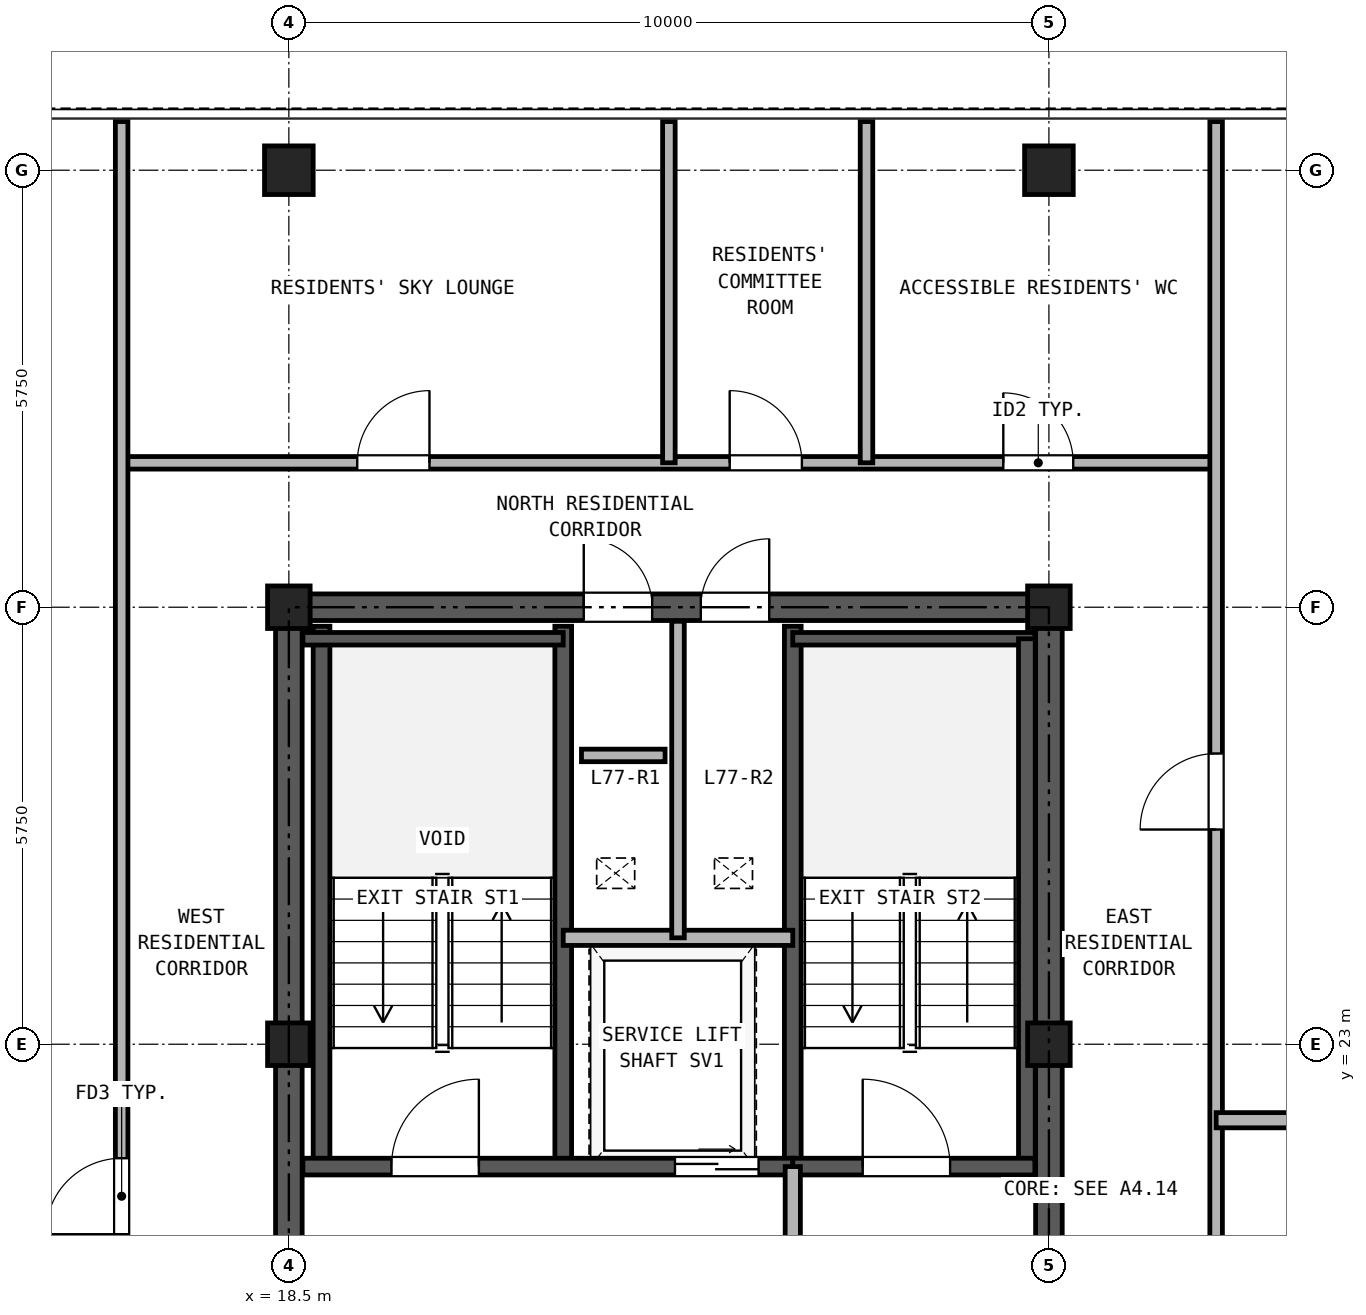
"""IFC4 building model, lengths in metres.
Left out: names, types, materials, properties, quantities, classifications, styles, units other than length and angle.
Written with IfcOpenShell. Run it as: python <this file> out.ifc"""

import sys

from ifc_helpers import new_model, si_unit, direction, frame, frame_2d, origin, origin_2d, place, context, subcontext, project, spatial, rectangle, hollow_rectangle, extrude, source, transform, mapped, element, fill, save


model = new_model("IFC4")
c1 = context("Model", 3, precision=1e-05, world=origin(), true_north=direction((0.0, 1.0)))
c2 = subcontext(c1, "Body", "Model", "MODEL_VIEW")
j1 = project(units=[si_unit("LENGTHUNIT", "METRE"), si_unit("PLANEANGLEUNIT", "RADIAN")], contexts=[c1])
p1 = place(None, origin())
s1 = spatial("IfcSite", under=j1, at=p1, CompositionType="ELEMENT")
p2 = place(p1, origin())
s2 = spatial("IfcBuilding", under=s1, at=p2, CompositionType="ELEMENT")
p3 = place(p2, frame((0.0, 0.0, 268.1)))
s3 = spatial("IfcBuildingStorey", under=s2, at=p3, CompositionType="ELEMENT", Elevation=268.1)
m1 = source(origin(), c2, "Body", "SweptSolid", [
    extrude(hollow_rectangle(XDim=0.64, YDim=0.64, WallThickness=0.035, at=origin_2d()), origin(), (0.0, 0.0, 1.0), 2.98),
])
for number, where, z_axis, x_axis in (
    (1, (18.5, 34.5, 0.0), (0.0, 0.0, 1.0), (1.0, 0.0, 0.0)),
    (2, (28.5, 34.5, 0.0), (0.0, 0.0, 1.0), (1.0, 0.0, 0.0)),
):
    element("IfcColumn", number, at=place(p3, frame(where, z_axis=z_axis, x_axis=x_axis)), inside=s3, PredefinedType="COLUMN", context=c2, shape_type="MappedRepresentation", body=[
        mapped(m1, transform((0.0, 0.0, 0.0), x_axis=(1.0, 0.0, 0.0), y_axis=(0.0, 1.0, 0.0), z_axis=(0.0, 0.0, 1.0), scale=1.0)),
    ])
m2 = source(origin(), c2, "Body", "SweptSolid", [
    extrude(hollow_rectangle(XDim=0.56, YDim=0.56, WallThickness=0.03, at=origin_2d()), origin(), (0.0, 0.0, 1.0), 2.98),
])
for number, where, z_axis, x_axis in (
    (3, (18.5, 23.0, 0.0), (0.0, 0.0, 1.0), (1.0, 0.0, 0.0)),
    (4, (18.5, 28.75, 0.0), (0.0, 0.0, 1.0), (1.0, 0.0, 0.0)),
    (5, (28.5, 23.0, 0.0), (0.0, 0.0, 1.0), (1.0, 0.0, 0.0)),
    (6, (28.5, 28.75, 0.0), (0.0, 0.0, 1.0), (1.0, 0.0, 0.0)),
):
    element("IfcColumn", number, at=place(p3, frame(where, z_axis=z_axis, x_axis=x_axis)), inside=s3, PredefinedType="COLUMN", context=c2, shape_type="MappedRepresentation", body=[
        mapped(m2, transform((0.0, 0.0, 0.0), x_axis=(1.0, 0.0, 0.0), y_axis=(0.0, 1.0, 0.0), z_axis=(0.0, 0.0, 1.0), scale=1.0)),
    ])
p4 = place(p3, frame((18.325, 28.75, 0.0), z_axis=(0.0, 0.0, 1.0), x_axis=(1.0, 0.0, 0.0)))
e7 = element("IfcWall", 7, at=p4, inside=s3, PredefinedType="SHEAR", context=c2, shape_type="SweptSolid", body=[
    extrude(rectangle(XDim=10.35, YDim=0.35, at=frame_2d((5.175, 0.0))), origin(), (0.0, 0.0, 1.0), 2.98),
])
p5 = place(p4, frame((4.055, 0.0, 0.0)))
e8 = element("IfcOpeningElement", 8, at=p5, cuts=e7, PredefinedType="OPENING", context=c2, shape_type="SweptSolid", body=[
    extrude(rectangle(XDim=0.9, YDim=2.05, at=frame_2d((0.45, 1.025))), frame((0.0, 0.185, 0.0), z_axis=(0.0, -1.0, 0.0), x_axis=(1.0, 0.0, 0.0)), (0.0, 0.0, 1.0), 0.37),
])
p6 = place(p4, frame((5.595, 0.0, 0.0)))
e9 = element("IfcOpeningElement", 9, at=p6, cuts=e7, PredefinedType="OPENING", context=c2, shape_type="SweptSolid", body=[
    extrude(rectangle(XDim=0.9, YDim=2.05, at=frame_2d((0.45, 1.025))), frame((0.0, 0.185, 0.0), z_axis=(0.0, -1.0, 0.0), x_axis=(1.0, 0.0, 0.0)), (0.0, 0.0, 1.0), 0.37),
])
p7 = place(p3, frame((18.5, 11.675, 0.0), z_axis=(0.0, 0.0, 1.0), x_axis=(0.0, 1.0, 0.0)))
e10 = element("IfcWall", 10, at=p7, inside=s3, PredefinedType="SHEAR", context=c2, shape_type="SweptSolid", body=[
    extrude(rectangle(XDim=16.9, YDim=0.35, at=frame_2d((8.45, 0.0))), origin(), (0.0, 0.0, 1.0), 2.98),
])
p8 = place(p7, frame((7.475, 0.0, 0.0)))
e11 = element("IfcOpeningElement", 11, at=p8, cuts=e10, PredefinedType="OPENING", context=c2, shape_type="SweptSolid", body=[
    extrude(rectangle(XDim=1.15, YDim=2.2, at=frame_2d((0.575, 1.1))), frame((0.0, 0.185, 0.0), z_axis=(0.0, -1.0, 0.0), x_axis=(1.0, 0.0, 0.0)), (0.0, 0.0, 1.0), 0.37),
])
p9 = place(p3, frame((28.5, 11.675, 0.0), z_axis=(0.0, 0.0, 1.0), x_axis=(0.0, 1.0, 0.0)))
e12 = element("IfcWall", 12, at=p9, inside=s3, PredefinedType="SHEAR", context=c2, shape_type="SweptSolid", body=[
    extrude(rectangle(XDim=16.9, YDim=0.35, at=frame_2d((8.45, 0.0))), origin(), (0.0, 0.0, 1.0), 2.98),
])
p10 = place(p9, frame((7.475, 0.0, 0.0)))
e13 = element("IfcOpeningElement", 13, at=p10, cuts=e12, PredefinedType="OPENING", context=c2, shape_type="SweptSolid", body=[
    extrude(rectangle(XDim=1.15, YDim=2.2, at=frame_2d((0.575, 1.1))), frame((0.0, 0.185, 0.0), z_axis=(0.0, -1.0, 0.0), x_axis=(1.0, 0.0, 0.0)), (0.0, 0.0, 1.0), 0.37),
])
for number, where, z_axis, x_axis in (
    (14, (18.93, 21.39, 0.0), (0.0, 0.0, 1.0), (0.0, 1.0, 0.0)),
    (15, (22.11, 21.39, 0.0), (0.0, 0.0, 1.0), (0.0, 1.0, 0.0)),
    (16, (25.13, 21.39, 0.0), (0.0, 0.0, 1.0), (0.0, 1.0, 0.0)),
):
    element("IfcWall", number, at=place(p3, frame(where, z_axis=z_axis, x_axis=x_axis)), inside=s3, PredefinedType="SOLIDWALL", context=c2, shape_type="SweptSolid", body=[
        extrude(rectangle(XDim=7.11, YDim=0.22, at=frame_2d((3.555, 0.0))), origin(), (0.0, 0.0, 1.0), 2.98),
    ])
p11 = place(p3, frame((18.685, 28.335, 0.0), z_axis=(0.0, 0.0, 1.0), x_axis=(1.0, 0.0, 0.0)))
e17 = element("IfcWall", 17, at=p11, inside=s3, PredefinedType="PARTITIONING", context=c2, shape_type="SweptSolid", body=[
    extrude(rectangle(XDim=3.425, YDim=0.165, at=frame_2d((1.712, 0.0))), origin(), (0.0, 0.0, 1.0), 2.98),
])
p12 = place(p3, frame((25.13, 28.335, 0.0), z_axis=(0.0, 0.0, 1.0), x_axis=(1.0, 0.0, 0.0)))
e18 = element("IfcWall", 18, at=p12, inside=s3, PredefinedType="PARTITIONING", context=c2, shape_type="SweptSolid", body=[
    extrude(rectangle(XDim=3.185, YDim=0.165, at=frame_2d((1.593, 0.0))), origin(), (0.0, 0.0, 1.0), 2.98),
])
p13 = place(p3, frame((28.21, 21.39, 0.0), z_axis=(0.0, 0.0, 1.0), x_axis=(0.0, 1.0, 0.0)))
e19 = element("IfcWall", 19, at=p13, inside=s3, PredefinedType="SOLIDWALL", context=c2, shape_type="SweptSolid", body=[
    extrude(rectangle(XDim=6.945, YDim=0.22, at=frame_2d((3.473, 0.0))), origin(), (0.0, 0.0, 1.0), 2.98),
])
p14 = place(p3, frame((18.685, 21.39, 0.0), z_axis=(0.0, 0.0, 1.0), x_axis=(1.0, 0.0, 0.0)))
e20 = element("IfcWall", 20, at=p14, inside=s3, PredefinedType="SOLIDWALL", context=c2, shape_type="SweptSolid", body=[
    extrude(rectangle(XDim=6.445, YDim=0.22, at=frame_2d((3.222, 0.0))), origin(), (0.0, 0.0, 1.0), 2.98),
])
p15 = place(p14, frame((1.165, 0.0, 0.0)))
e21 = element("IfcOpeningElement", 21, at=p15, cuts=e20, PredefinedType="OPENING", context=c2, shape_type="SweptSolid", body=[
    extrude(rectangle(XDim=1.15, YDim=2.2, at=frame_2d((0.575, 1.1))), frame((0.0, 0.12, 0.0), z_axis=(0.0, -1.0, 0.0), x_axis=(1.0, 0.0, 0.0)), (0.0, 0.0, 1.0), 0.24),
])
p16 = place(p14, frame((4.895, 0.0, 0.0)))
e22 = element("IfcOpeningElement", 22, at=p16, cuts=e20, PredefinedType="OPENING", context=c2, shape_type="SweptSolid", body=[
    extrude(rectangle(XDim=1.1, YDim=2.25, at=frame_2d((0.55, 1.125))), frame((0.0, 0.12, 0.0), z_axis=(0.0, -1.0, 0.0), x_axis=(1.0, 0.0, 0.0)), (0.0, 0.0, 1.0), 0.24),
])
p17 = place(p3, frame((25.13, 21.39, 0.0), z_axis=(0.0, 0.0, 1.0), x_axis=(1.0, 0.0, 0.0)))
e23 = element("IfcWall", 23, at=p17, inside=s3, PredefinedType="SOLIDWALL", context=c2, shape_type="SweptSolid", body=[
    extrude(rectangle(XDim=3.185, YDim=0.22, at=frame_2d((1.593, 0.0))), origin(), (0.0, 0.0, 1.0), 2.98),
])
p18 = place(p17, frame((0.92, 0.0, 0.0)))
e24 = element("IfcOpeningElement", 24, at=p18, cuts=e23, PredefinedType="OPENING", context=c2, shape_type="SweptSolid", body=[
    extrude(rectangle(XDim=1.15, YDim=2.2, at=frame_2d((0.575, 1.1))), frame((0.0, 0.12, 0.0), z_axis=(0.0, -1.0, 0.0), x_axis=(1.0, 0.0, 0.0)), (0.0, 0.0, 1.0), 0.24),
])
p19 = place(p3, frame((22.11, 24.4, 0.0), z_axis=(0.0, 0.0, 1.0), x_axis=(1.0, 0.0, 0.0)))
e25 = element("IfcWall", 25, at=p19, inside=s3, PredefinedType="PARTITIONING", context=c2, shape_type="SweptSolid", body=[
    extrude(rectangle(XDim=3.02, YDim=0.2, at=frame_2d((1.51, 0.0))), origin(), (0.0, 0.0, 1.0), 2.98),
])
p20 = place(p3, frame((23.62, 24.4, 0.0), z_axis=(0.0, 0.0, 1.0), x_axis=(0.0, 1.0, 0.0)))
e26 = element("IfcWall", 26, at=p20, inside=s3, PredefinedType="PARTITIONING", context=c2, shape_type="SweptSolid", body=[
    extrude(rectangle(XDim=4.165, YDim=0.165, at=frame_2d((2.083, 0.0))), origin(), (0.0, 0.0, 1.0), 2.98),
])
p21 = place(p3, frame((25.13, 18.0, 0.0), z_axis=(0.0, 0.0, 1.0), x_axis=(0.0, 1.0, 0.0)))
e27 = element("IfcWall", 27, at=p21, inside=s3, PredefinedType="PARTITIONING", context=c2, shape_type="SweptSolid", body=[
    extrude(rectangle(XDim=3.39, YDim=0.2, at=frame_2d((1.695, 0.0))), origin(), (0.0, 0.0, 1.0), 2.98),
])
p22 = place(p21, frame((1.1, 0.0, 0.0)))
e28 = element("IfcOpeningElement", 28, at=p22, cuts=e27, PredefinedType="OPENING", context=c2, shape_type="SweptSolid", body=[
    extrude(rectangle(XDim=1.15, YDim=2.2, at=frame_2d((0.575, 1.1))), frame((0.0, 0.11, 0.0), z_axis=(0.0, -1.0, 0.0), x_axis=(1.0, 0.0, 0.0)), (0.0, 0.0, 1.0), 0.22),
])
p23 = place(p3, frame((16.3, 30.65, 0.0), z_axis=(0.0, 0.0, 1.0), x_axis=(1.0, 0.0, 0.0)))
e29 = element("IfcWall", 29, at=p23, inside=s3, PredefinedType="PARTITIONING", context=c2, shape_type="SweptSolid", body=[
    extrude(rectangle(XDim=14.4, YDim=0.165, at=frame_2d((7.2, 0.0))), origin(), (0.0, 0.0, 1.0), 2.98),
])
p24 = place(p23, frame((3.1, 0.0, 0.0)))
e30 = element("IfcOpeningElement", 30, at=p24, cuts=e29, PredefinedType="OPENING", context=c2, shape_type="SweptSolid", body=[
    extrude(rectangle(XDim=0.95, YDim=2.15, at=frame_2d((0.475, 1.075))), frame((0.0, 0.093, 0.0), z_axis=(0.0, -1.0, 0.0), x_axis=(1.0, 0.0, 0.0)), (0.0, 0.0, 1.0), 0.185),
])
p25 = place(p23, frame((8.0, 0.0, 0.0)))
e31 = element("IfcOpeningElement", 31, at=p25, cuts=e29, PredefinedType="OPENING", context=c2, shape_type="SweptSolid", body=[
    extrude(rectangle(XDim=0.95, YDim=2.15, at=frame_2d((0.475, 1.075))), frame((0.0, 0.093, 0.0), z_axis=(0.0, -1.0, 0.0), x_axis=(1.0, 0.0, 0.0)), (0.0, 0.0, 1.0), 0.185),
])
p26 = place(p23, frame((11.6, 0.0, 0.0)))
e32 = element("IfcOpeningElement", 32, at=p26, cuts=e29, PredefinedType="OPENING", context=c2, shape_type="SweptSolid", body=[
    extrude(rectangle(XDim=0.92, YDim=2.1, at=frame_2d((0.46, 1.05))), frame((0.0, 0.093, 0.0), z_axis=(0.0, -1.0, 0.0), x_axis=(1.0, 0.0, 0.0)), (0.0, 0.0, 1.0), 0.185),
])
p27 = place(p3, frame((16.3, 11.35, 0.0), z_axis=(0.0, 0.0, 1.0), x_axis=(0.0, 1.0, 0.0)))
e33 = element("IfcWall", 33, at=p27, inside=s3, PredefinedType="PARTITIONING", context=c2, shape_type="SweptSolid", body=[
    extrude(rectangle(XDim=23.79, YDim=0.165, at=frame_2d((11.895, 0.0))), origin(), (0.0, 0.0, 1.0), 2.98),
])
p28 = place(p27, frame((9.15, 0.0, 0.0)))
e34 = element("IfcOpeningElement", 34, at=p28, cuts=e33, PredefinedType="OPENING", context=c2, shape_type="SweptSolid", body=[
    extrude(rectangle(XDim=1.0, YDim=2.15, at=frame_2d((0.5, 1.075))), frame((0.0, 0.093, 0.0), z_axis=(0.0, -1.0, 0.0), x_axis=(1.0, 0.0, 0.0)), (0.0, 0.0, 1.0), 0.185),
])
p29 = place(p3, frame((30.7, 11.35, 0.0), z_axis=(0.0, 0.0, 1.0), x_axis=(0.0, 1.0, 0.0)))
e35 = element("IfcWall", 35, at=p29, inside=s3, PredefinedType="PARTITIONING", context=c2, shape_type="SweptSolid", body=[
    extrude(rectangle(XDim=23.79, YDim=0.165, at=frame_2d((11.895, 0.0))), origin(), (0.0, 0.0, 1.0), 2.98),
])
p30 = place(p29, frame((4.825, 0.0, 0.0)))
e36 = element("IfcOpeningElement", 36, at=p30, cuts=e35, PredefinedType="OPENING", context=c2, shape_type="SweptSolid", body=[
    extrude(rectangle(XDim=1.0, YDim=2.15, at=frame_2d((0.5, 1.075))), frame((0.0, 0.093, 0.0), z_axis=(0.0, -1.0, 0.0), x_axis=(1.0, 0.0, 0.0)), (0.0, 0.0, 1.0), 0.185),
])
p31 = place(p29, frame((14.475, 0.0, 0.0)))
e37 = element("IfcOpeningElement", 37, at=p31, cuts=e35, PredefinedType="OPENING", context=c2, shape_type="SweptSolid", body=[
    extrude(rectangle(XDim=1.0, YDim=2.15, at=frame_2d((0.5, 1.075))), frame((0.0, 0.093, 0.0), z_axis=(0.0, -1.0, 0.0), x_axis=(1.0, 0.0, 0.0)), (0.0, 0.0, 1.0), 0.185),
])
p32 = place(p3, frame((30.7, 22.0, 0.0), z_axis=(0.0, 0.0, 1.0), x_axis=(1.0, 0.0, 0.0)))
e38 = element("IfcWall", 38, at=p32, inside=s3, PredefinedType="PARTITIONING", context=c2, shape_type="SweptSolid", body=[
    extrude(rectangle(XDim=10.94, YDim=0.2, at=frame_2d((5.47, 0.0))), origin(), (0.0, 0.0, 1.0), 2.98),
])
for number, where, z_axis, x_axis in (
    (39, (23.5, 30.65, 0.0), (0.0, 0.0, 1.0), (0.0, 1.0, 0.0)),
    (40, (26.1, 30.65, 0.0), (0.0, 0.0, 1.0), (0.0, 1.0, 0.0)),
):
    element("IfcWall", number, at=place(p3, frame(where, z_axis=z_axis, x_axis=x_axis)), inside=s3, PredefinedType="PARTITIONING", context=c2, shape_type="SweptSolid", body=[
        extrude(rectangle(XDim=4.49, YDim=0.165, at=frame_2d((2.245, 0.0))), origin(), (0.0, 0.0, 1.0), 2.98),
    ])
p33 = place(p3, frame((22.35, 26.8, 0.0), z_axis=(0.0, 0.0, 1.0), x_axis=(1.0, 0.0, 0.0)))
e41 = element("IfcWall", 41, at=p33, inside=s3, PredefinedType="PARTITIONING", context=c2, shape_type="SweptSolid", body=[
    extrude(rectangle(XDim=1.1, YDim=0.165, at=frame_2d((0.55, 0.0))), origin(), (0.0, 0.0, 1.0), 2.98),
])
p34 = place(p15, frame((1.15, 0.0, 0.0), z_axis=(0.0, 0.0, 1.0), x_axis=(-1.0, 0.0, 0.0)))
e42 = element("IfcDoor", 42, at=p34, inside=s3, OperationType="SINGLE_SWING_RIGHT", PredefinedType="DOOR", context=c2, shape_type="SweptSolid", body=[
    extrude(rectangle(XDim=1.15, YDim=2.2, at=frame_2d((0.575, 1.1))), frame((0.0, 0.025, 0.0), z_axis=(0.0, -1.0, 0.0), x_axis=(1.0, 0.0, 0.0)), (0.0, 0.0, 1.0), 0.05),
])
fill(e21, e42)
p35 = place(p18, frame((1.15, 0.0, 0.0), z_axis=(0.0, 0.0, 1.0), x_axis=(-1.0, 0.0, 0.0)))
e43 = element("IfcDoor", 43, at=p35, inside=s3, OperationType="SINGLE_SWING_LEFT", PredefinedType="DOOR", context=c2, shape_type="SweptSolid", body=[
    extrude(rectangle(XDim=1.15, YDim=2.2, at=frame_2d((0.575, 1.1))), frame((0.0, 0.025, 0.0), z_axis=(0.0, -1.0, 0.0), x_axis=(1.0, 0.0, 0.0)), (0.0, 0.0, 1.0), 0.05),
])
fill(e24, e43)
p36 = place(p16, frame((1.1, 0.0, 0.0), z_axis=(0.0, 0.0, 1.0), x_axis=(-1.0, 0.0, 0.0)))
e44 = element("IfcDoor", 44, at=p36, inside=s3, OperationType="DOUBLE_DOOR_SLIDING", PredefinedType="DOOR", context=c2, shape_type="SweptSolid", body=[
    extrude(rectangle(XDim=1.1, YDim=2.25, at=frame_2d((0.55, 1.125))), frame((0.0, 0.025, 0.0), z_axis=(0.0, -1.0, 0.0), x_axis=(1.0, 0.0, 0.0)), (0.0, 0.0, 1.0), 0.05),
])
fill(e22, e44)
p37 = place(p5, origin())
e45 = element("IfcDoor", 45, at=p37, inside=s3, OperationType="SINGLE_SWING_LEFT", PredefinedType="DOOR", context=c2, shape_type="SweptSolid", body=[
    extrude(rectangle(XDim=0.9, YDim=2.05, at=frame_2d((0.45, 1.025))), frame((0.0, 0.025, 0.0), z_axis=(0.0, -1.0, 0.0), x_axis=(1.0, 0.0, 0.0)), (0.0, 0.0, 1.0), 0.05),
])
fill(e8, e45)
p38 = place(p6, origin())
e46 = element("IfcDoor", 46, at=p38, inside=s3, OperationType="SINGLE_SWING_RIGHT", PredefinedType="DOOR", context=c2, shape_type="SweptSolid", body=[
    extrude(rectangle(XDim=0.9, YDim=2.05, at=frame_2d((0.45, 1.025))), frame((0.0, 0.025, 0.0), z_axis=(0.0, -1.0, 0.0), x_axis=(1.0, 0.0, 0.0)), (0.0, 0.0, 1.0), 0.05),
])
fill(e9, e46)
p39 = place(p28, origin())
e47 = element("IfcDoor", 47, at=p39, inside=s3, OperationType="SINGLE_SWING_LEFT", PredefinedType="DOOR", context=c2, shape_type="SweptSolid", body=[
    extrude(rectangle(XDim=1.0, YDim=2.15, at=frame_2d((0.5, 1.075))), frame((0.0, 0.025, 0.0), z_axis=(0.0, -1.0, 0.0), x_axis=(1.0, 0.0, 0.0)), (0.0, 0.0, 1.0), 0.05),
])
fill(e34, e47)
p40 = place(p31, frame((1.0, 0.0, 0.0), z_axis=(0.0, 0.0, 1.0), x_axis=(-1.0, 0.0, 0.0)))
e48 = element("IfcDoor", 48, at=p40, inside=s3, OperationType="SINGLE_SWING_LEFT", PredefinedType="DOOR", context=c2, shape_type="SweptSolid", body=[
    extrude(rectangle(XDim=1.0, YDim=2.15, at=frame_2d((0.5, 1.075))), frame((0.0, 0.025, 0.0), z_axis=(0.0, -1.0, 0.0), x_axis=(1.0, 0.0, 0.0)), (0.0, 0.0, 1.0), 0.05),
])
fill(e37, e48)
p41 = place(p24, origin())
e49 = element("IfcDoor", 49, at=p41, inside=s3, OperationType="SINGLE_SWING_RIGHT", PredefinedType="DOOR", context=c2, shape_type="SweptSolid", body=[
    extrude(rectangle(XDim=0.95, YDim=2.15, at=frame_2d((0.475, 1.075))), frame((0.0, 0.025, 0.0), z_axis=(0.0, -1.0, 0.0), x_axis=(1.0, 0.0, 0.0)), (0.0, 0.0, 1.0), 0.05),
])
fill(e30, e49)
p42 = place(p25, origin())
e50 = element("IfcDoor", 50, at=p42, inside=s3, OperationType="SINGLE_SWING_LEFT", PredefinedType="DOOR", context=c2, shape_type="SweptSolid", body=[
    extrude(rectangle(XDim=0.95, YDim=2.15, at=frame_2d((0.475, 1.075))), frame((0.0, 0.025, 0.0), z_axis=(0.0, -1.0, 0.0), x_axis=(1.0, 0.0, 0.0)), (0.0, 0.0, 1.0), 0.05),
])
fill(e31, e50)
p43 = place(p26, origin())
e51 = element("IfcDoor", 51, at=p43, inside=s3, OperationType="SINGLE_SWING_LEFT", PredefinedType="DOOR", context=c2, shape_type="SweptSolid", body=[
    extrude(rectangle(XDim=0.92, YDim=2.1, at=frame_2d((0.46, 1.05))), frame((0.0, 0.025, 0.0), z_axis=(0.0, -1.0, 0.0), x_axis=(1.0, 0.0, 0.0)), (0.0, 0.0, 1.0), 0.05),
])
fill(e32, e51)
save(model, sys.argv[1])
